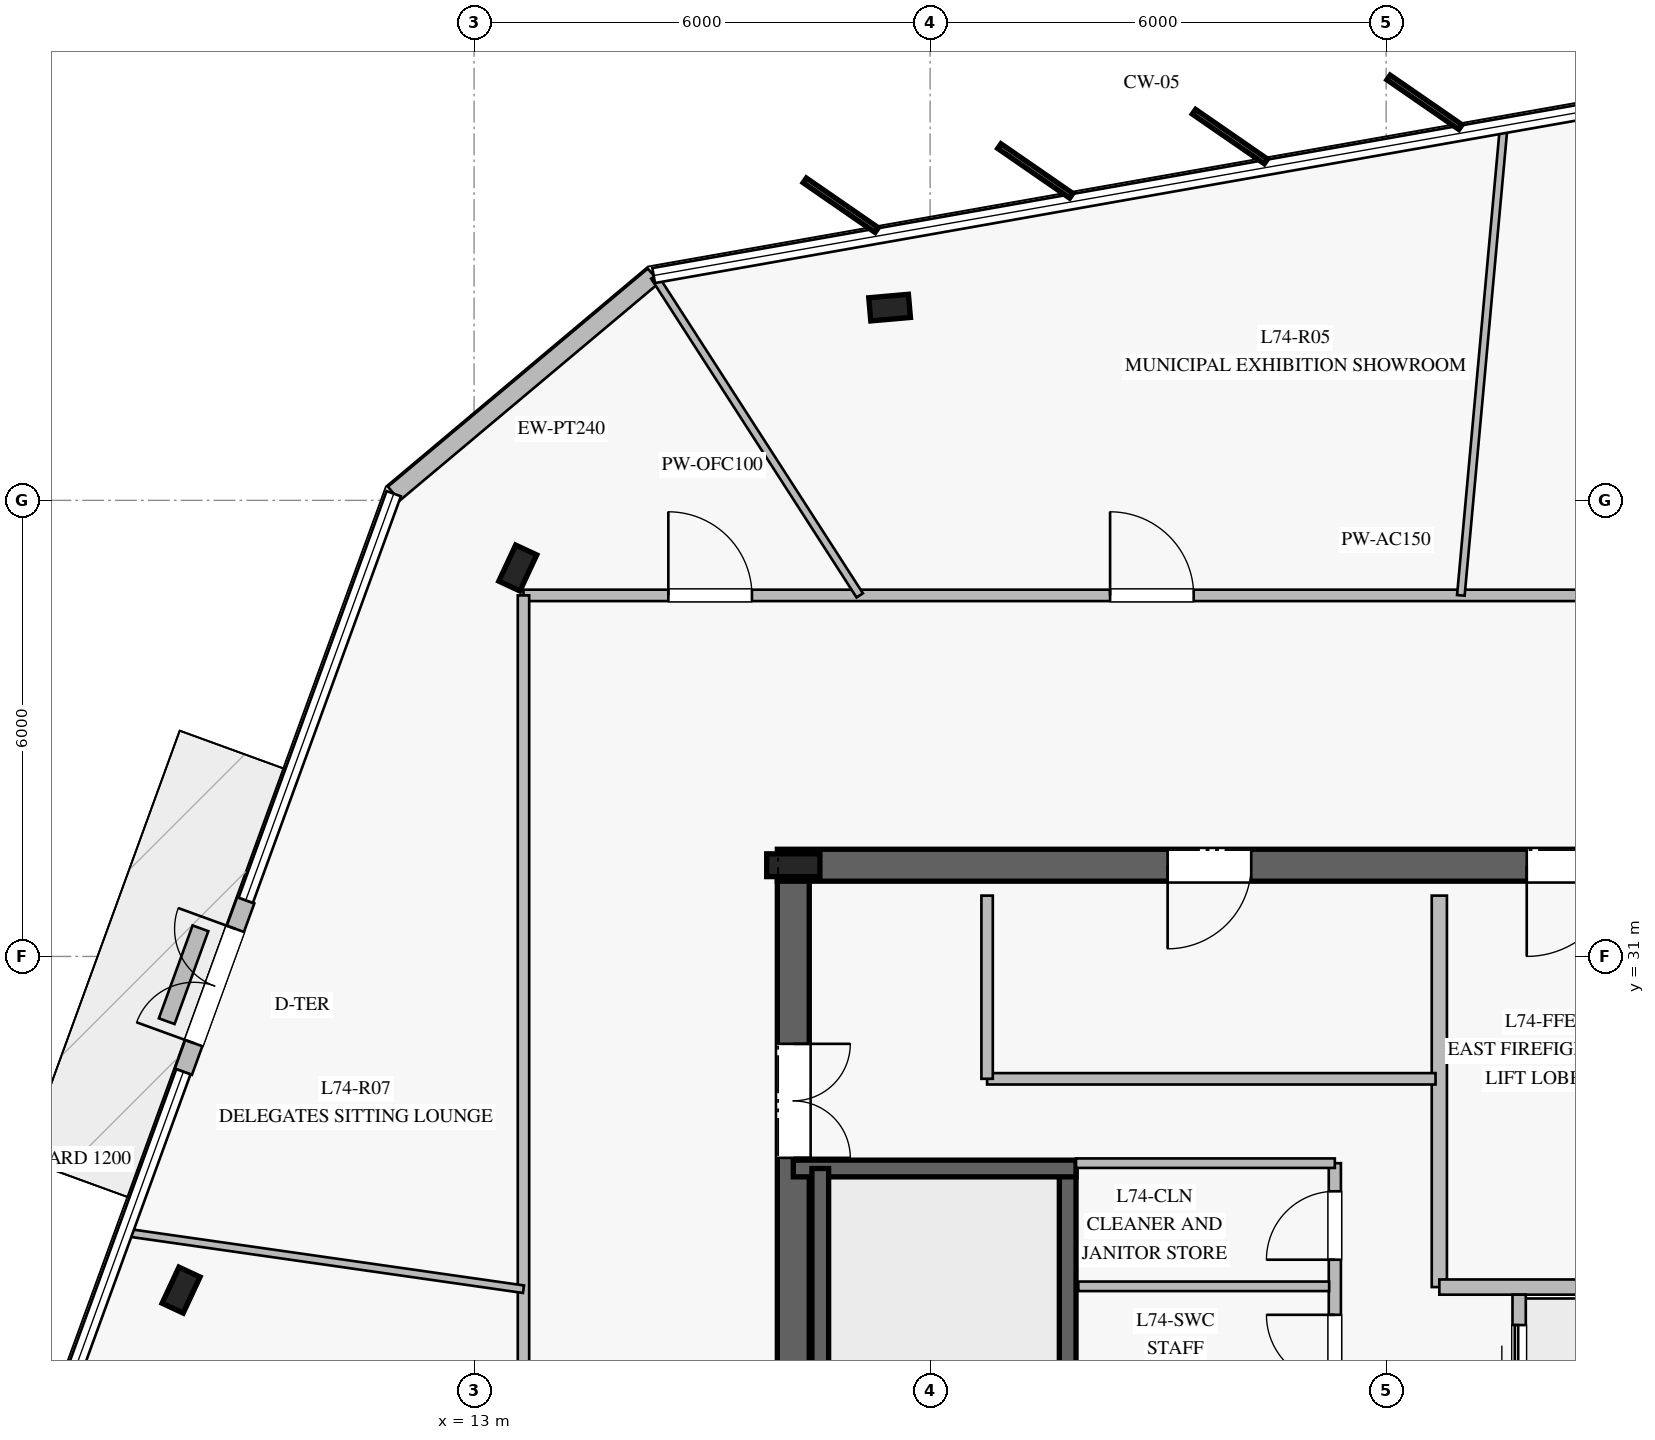
"""IFC4 building model, lengths in metres.
Left out: names, types, materials, properties, quantities, classifications, styles, units other than length and angle.
Written with IfcOpenShell. Run it as: python <this file> out.ifc"""

import sys

from ifc_helpers import new_model, si_unit, direction, frame, frame_2d, origin, origin_2d, place, context, subcontext, project, spatial, rectangle, i_section, extrude, element, fill, save


model = new_model("IFC4")
c1 = context("Model", 3, precision=1e-05, world=origin(), true_north=direction((0.0, 1.0)))
c2 = subcontext(c1, "Body", "Model", "MODEL_VIEW")
j1 = project(units=[si_unit("LENGTHUNIT", "METRE"), si_unit("PLANEANGLEUNIT", "RADIAN")], contexts=[c1])
p1 = place(None, origin())
s1 = spatial("IfcSite", under=j1, at=p1, CompositionType="ELEMENT")
p2 = place(p1, origin())
s2 = spatial("IfcBuilding", under=s1, at=p2, CompositionType="ELEMENT")
p3 = place(p2, frame((0.0, 0.0, 306.2)))
s3 = spatial("IfcBuildingStorey", under=s2, at=p3, CompositionType="ELEMENT", Elevation=306.2)
p4 = place(p3, frame((33.01, 32.2, 0.0), z_axis=(0.0, 0.0, 1.0), x_axis=(-1.0, 0.0, 0.0)))
e1 = element("IfcWall", 1, at=p4, inside=s3, PredefinedType="SHEAR", context=c2, shape_type="SweptSolid", body=[
    extrude(rectangle(XDim=16.02, YDim=0.42, at=frame_2d((8.01, 0.0))), origin(), (0.0, 0.0, 1.0), 3.78),
])
p5 = place(p4, frame((4.96, 0.0, 0.0)))
e2 = element("IfcOpeningElement", 2, at=p5, cuts=e1, PredefinedType="OPENING", context=c2, shape_type="SweptSolid", body=[
    extrude(rectangle(XDim=1.2, YDim=2.25, at=frame_2d((0.6, 1.125))), frame((0.0, 0.22, 0.0), z_axis=(0.0, -1.0, 0.0), x_axis=(1.0, 0.0, 0.0)), (0.0, 0.0, 1.0), 0.44),
])
p6 = place(p4, frame((9.785, 0.0, 0.0)))
e3 = element("IfcOpeningElement", 3, at=p6, cuts=e1, PredefinedType="OPENING", context=c2, shape_type="SweptSolid", body=[
    extrude(rectangle(XDim=1.1, YDim=2.2, at=frame_2d((0.55, 1.1))), frame((0.0, 0.22, 0.0), z_axis=(0.0, -1.0, 0.0), x_axis=(1.0, 0.0, 0.0)), (0.0, 0.0, 1.0), 0.44),
])
p7 = place(p3, frame((17.2, 31.99, 0.0), z_axis=(0.0, 0.0, 1.0), x_axis=(0.0, -1.0, 0.0)))
e4 = element("IfcWall", 4, at=p7, inside=s3, PredefinedType="SHEAR", context=c2, shape_type="SweptSolid", body=[
    extrude(rectangle(XDim=13.98, YDim=0.42, at=frame_2d((6.99, 0.0))), origin(), (0.0, 0.0, 1.0), 3.78),
])
p8 = place(p7, frame((2.14, 0.0, 0.0)))
e5 = element("IfcOpeningElement", 5, at=p8, cuts=e4, PredefinedType="OPENING", context=c2, shape_type="SweptSolid", body=[
    extrude(rectangle(XDim=1.5, YDim=2.2, at=frame_2d((0.75, 1.1))), frame((0.0, 0.22, 0.0), z_axis=(0.0, -1.0, 0.0), x_axis=(1.0, 0.0, 0.0)), (0.0, 0.0, 1.0), 0.44),
])
p9 = place(p3, frame((17.2, 32.2, 0.0), z_axis=(0.0, 0.0, 1.0), x_axis=(1.0, 0.0, 0.0)))
e6 = element("IfcColumn", 6, at=p9, inside=s3, PredefinedType="COLUMN", context=c2, shape_type="SweptSolid", body=[
    extrude(i_section(OverallWidth=0.3, OverallDepth=0.7, WebThickness=0.017, FlangeThickness=0.032, at=origin_2d()), origin(), (0.0, 0.0, 1.0), 4.0),
])
p10 = place(p3, frame((20.81, 20.99, 0.0), z_axis=(0.0, 0.0, 1.0), x_axis=(0.0, 1.0, 0.0)))
e7 = element("IfcWall", 7, at=p10, inside=s3, PredefinedType="SOLIDWALL", context=c2, shape_type="SweptSolid", body=[
    extrude(rectangle(XDim=7.22, YDim=0.22, at=frame_2d((3.61, 0.0))), origin(), (0.0, 0.0, 1.0), 3.78),
])
p11 = place(p10, frame((0.18, 0.0, 0.0)))
e8 = element("IfcOpeningElement", 8, at=p11, cuts=e7, PredefinedType="OPENING", context=c2, shape_type="SweptSolid", body=[
    extrude(rectangle(XDim=1.15, YDim=2.2, at=frame_2d((0.575, 1.1))), frame((0.0, 0.12, 0.0), z_axis=(0.0, -1.0, 0.0), x_axis=(1.0, 0.0, 0.0)), (0.0, 0.0, 1.0), 0.24),
])
p12 = place(p3, frame((17.2, 28.21, 0.0), z_axis=(0.0, 0.0, 1.0), x_axis=(1.0, 0.0, 0.0)))
e9 = element("IfcWall", 9, at=p12, inside=s3, PredefinedType="SOLIDWALL", context=c2, shape_type="SweptSolid", body=[
    extrude(rectangle(XDim=3.72, YDim=0.22, at=frame_2d((1.86, 0.0))), origin(), (0.0, 0.0, 1.0), 3.78),
])
p13 = place(p3, frame((17.555, 28.21, 0.0), z_axis=(0.0, 0.0, 1.0), x_axis=(0.0, -1.0, 0.0)))
e10 = element("IfcWall", 10, at=p13, inside=s3, PredefinedType="SOLIDWALL", context=c2, shape_type="SweptSolid", body=[
    extrude(rectangle(XDim=7.22, YDim=0.22, at=frame_2d((3.61, 0.0))), origin(), (0.0, 0.0, 1.0), 3.78),
])
for number, where, z_axis, x_axis in (
    (11, (18.467, 39.536, 0.0), (0.0, 0.0, 1.0), (0.996, 0.087, 0.0)),
    (12, (13.575, 36.11, 0.0), (0.0, 0.0, 1.0), (0.423, 0.906, 0.0)),
    (13, (9.145, 26.61, 0.0), (0.0, 0.0, 1.0), (0.423, 0.906, 0.0)),
):
    element("IfcColumn", number, at=place(p3, frame(where, z_axis=z_axis, x_axis=x_axis)), inside=s3, PredefinedType="COLUMN", context=c2, shape_type="SweptSolid", body=[
        extrude(i_section(OverallWidth=0.306, OverallDepth=0.524, WebThickness=0.021, FlangeThickness=0.04, at=origin_2d()), origin(), (0.0, 0.0, 1.0), 4.0),
    ])
p14 = place(p3, frame((15.363, 39.958, 0.0), z_axis=(0.0, 0.0, 1.0), x_axis=(-0.765993487021, -0.642848331912, 0.0)))
e14 = element("IfcWall", 14, at=p14, inside=s3, PredefinedType="STANDARD", context=c2, shape_type="SweptSolid", body=[
    extrude(rectangle(XDim=4.465, YDim=0.24, at=frame_2d((2.232, 0.0))), origin(), (0.0, 0.0, 1.0), 3.78),
])
p15 = place(p3, frame((9.996, 31.739, 0.0), z_axis=(0.0, 0.0, 1.0), x_axis=(-0.341979831546, -0.939707292095, 0.0)))
e15 = element("IfcWall", 15, at=p15, inside=s3, PredefinedType="STANDARD", context=c2, shape_type="SweptSolid", body=[
    extrude(rectangle(XDim=2.401, YDim=0.24, at=frame_2d((1.2, 0.0))), origin(), (0.0, 0.0, 1.0), 3.78),
])
p16 = place(p15, frame((0.4, 0.0, 0.0)))
e16 = element("IfcOpeningElement", 16, at=p16, cuts=e15, PredefinedType="OPENING", context=c2, shape_type="SweptSolid", body=[
    extrude(rectangle(XDim=1.6, YDim=2.25, at=frame_2d((0.8, 1.125))), frame((0.0, 0.13, 0.0), z_axis=(0.0, -1.0, 0.0), x_axis=(1.0, 0.0, 0.0)), (0.0, 0.0, 1.0), 0.26),
])
p17 = place(p3, frame((9.4, 31.37, 0.0), z_axis=(0.0, 0.0, 1.0), x_axis=(-0.341351063346, -0.939935876298, 0.0)))
e17 = element("IfcWall", 17, at=p17, inside=s3, PredefinedType="USERDEFINED", context=c2, shape_type="SweptSolid", body=[
    extrude(rectangle(XDim=1.3, YDim=0.22, at=frame_2d((0.65, 0.0))), origin(), (0.0, 0.0, 1.0), 0.4),
])
p18 = place(p3, frame((25.7, 26.65, 0.0), z_axis=(0.0, 0.0, 1.0), x_axis=(0.0, 1.0, 0.0)))
e18 = element("IfcWall", 18, at=p18, inside=s3, PredefinedType="PARTITIONING", context=c2, shape_type="SweptSolid", body=[
    extrude(rectangle(XDim=5.15, YDim=0.2, at=frame_2d((2.575, 0.0))), origin(), (0.0, 0.0, 1.0), 3.78),
])
p19 = place(p3, frame((25.7, 26.65, 0.0), z_axis=(0.0, 0.0, 1.0), x_axis=(1.0, 0.0, 0.0)))
e19 = element("IfcWall", 19, at=p19, inside=s3, PredefinedType="PARTITIONING", context=c2, shape_type="SweptSolid", body=[
    extrude(rectangle(XDim=3.38, YDim=0.2, at=frame_2d((1.69, 0.0))), origin(), (0.0, 0.0, 1.0), 3.78),
])
p20 = place(p3, frame((24.325, 23.35, 0.0), z_axis=(0.0, 0.0, 1.0), x_axis=(0.0, 1.0, 0.0)))
e20 = element("IfcWall", 20, at=p20, inside=s3, PredefinedType="PLUMBINGWALL", context=c2, shape_type="SweptSolid", body=[
    extrude(rectangle(XDim=4.93, YDim=0.16, at=frame_2d((2.465, 0.0))), origin(), (0.0, 0.0, 1.0), 3.78),
])
p21 = place(p20, frame((0.375, 0.0, 0.0)))
e21 = element("IfcOpeningElement", 21, at=p21, cuts=e20, PredefinedType="OPENING", context=c2, shape_type="SweptSolid", body=[
    extrude(rectangle(XDim=0.95, YDim=2.1, at=frame_2d((0.475, 1.05))), frame((0.0, 0.09, 0.0), z_axis=(0.0, -1.0, 0.0), x_axis=(1.0, 0.0, 0.0)), (0.0, 0.0, 1.0), 0.18),
])
p22 = place(p20, frame((2.035, 0.0, 0.0)))
e22 = element("IfcOpeningElement", 22, at=p22, cuts=e20, PredefinedType="OPENING", context=c2, shape_type="SweptSolid", body=[
    extrude(rectangle(XDim=0.9, YDim=2.1, at=frame_2d((0.45, 1.05))), frame((0.0, 0.09, 0.0), z_axis=(0.0, -1.0, 0.0), x_axis=(1.0, 0.0, 0.0)), (0.0, 0.0, 1.0), 0.18),
])
p23 = place(p20, frame((3.66, 0.0, 0.0)))
e23 = element("IfcOpeningElement", 23, at=p23, cuts=e20, PredefinedType="OPENING", context=c2, shape_type="SweptSolid", body=[
    extrude(rectangle(XDim=0.9, YDim=2.1, at=frame_2d((0.45, 1.05))), frame((0.0, 0.09, 0.0), z_axis=(0.0, -1.0, 0.0), x_axis=(1.0, 0.0, 0.0)), (0.0, 0.0, 1.0), 0.18),
])
p24 = place(p3, frame((20.92, 28.28, 0.0), z_axis=(0.0, 0.0, 1.0), x_axis=(1.0, 0.0, 0.0)))
e24 = element("IfcWall", 24, at=p24, inside=s3, PredefinedType="PARTITIONING", context=c2, shape_type="SweptSolid", body=[
    extrude(rectangle(XDim=3.405, YDim=0.125, at=frame_2d((1.703, 0.0))), origin(), (0.0, 0.0, 1.0), 3.78),
])
p25 = place(p3, frame((20.95, 26.66, 0.0), z_axis=(0.0, 0.0, 1.0), x_axis=(1.0, 0.0, 0.0)))
e25 = element("IfcWall", 25, at=p25, inside=s3, PredefinedType="PARTITIONING", context=c2, shape_type="SweptSolid", body=[
    extrude(rectangle(XDim=3.3, YDim=0.125, at=frame_2d((1.65, 0.0))), origin(), (0.0, 0.0, 1.0), 3.78),
])
p26 = place(p3, frame((19.75, 29.39, 0.0), z_axis=(0.0, 0.0, 1.0), x_axis=(1.0, 0.0, 0.0)))
e26 = element("IfcWall", 26, at=p26, inside=s3, PredefinedType="PARTITIONING", context=c2, shape_type="SweptSolid", body=[
    extrude(rectangle(XDim=5.9, YDim=0.15, at=frame_2d((2.95, 0.0))), origin(), (0.0, 0.0, 1.0), 3.78),
])
p27 = place(p3, frame((19.75, 29.39, 0.0), z_axis=(0.0, 0.0, 1.0), x_axis=(0.0, 1.0, 0.0)))
e27 = element("IfcWall", 27, at=p27, inside=s3, PredefinedType="PARTITIONING", context=c2, shape_type="SweptSolid", body=[
    extrude(rectangle(XDim=2.41, YDim=0.15, at=frame_2d((1.205, 0.0))), origin(), (0.0, 0.0, 1.0), 3.78),
])
p28 = place(p3, frame((26.75, 24.65, 0.0), z_axis=(0.0, 0.0, 1.0), x_axis=(0.0, 1.0, 0.0)))
e28 = element("IfcWall", 28, at=p28, inside=s3, PredefinedType="PARTITIONING", context=c2, shape_type="SweptSolid", body=[
    extrude(rectangle(XDim=1.9, YDim=0.175, at=frame_2d((0.95, 0.0))), origin(), (0.0, 0.0, 1.0), 3.78),
])
p29 = place(p28, frame((0.4, 0.0, 0.0)))
e29 = element("IfcOpeningElement", 29, at=p29, cuts=e28, PredefinedType="OPENING", context=c2, shape_type="SweptSolid", body=[
    extrude(rectangle(XDim=1.1, YDim=2.2, at=frame_2d((0.55, 1.1))), frame((0.0, 0.098, 0.0), z_axis=(0.0, -1.0, 0.0), x_axis=(1.0, 0.0, 0.0)), (0.0, 0.0, 1.0), 0.195),
])
p30 = place(p3, frame((13.65, 35.75, 0.0), z_axis=(0.0, 0.0, 1.0), x_axis=(1.0, 0.0, 0.0)))
e30 = element("IfcWall", 30, at=p30, inside=s3, PredefinedType="PARTITIONING", context=c2, shape_type="SweptSolid", body=[
    extrude(rectangle(XDim=22.7, YDim=0.15, at=frame_2d((11.35, 0.0))), origin(), (0.0, 0.0, 1.0), 3.28),
])
p31 = place(p30, frame((7.718, 0.0, 0.0)))
e31 = element("IfcOpeningElement", 31, at=p31, cuts=e30, PredefinedType="OPENING", context=c2, shape_type="SweptSolid", body=[
    extrude(rectangle(XDim=1.1, YDim=2.2, at=frame_2d((0.55, 1.1))), frame((0.0, 0.085, 0.0), z_axis=(0.0, -1.0, 0.0), x_axis=(1.0, 0.0, 0.0)), (0.0, 0.0, 1.0), 0.17),
])
p32 = place(p30, frame((16.786, 0.0, 0.0)))
e32 = element("IfcOpeningElement", 32, at=p32, cuts=e30, PredefinedType="OPENING", context=c2, shape_type="SweptSolid", body=[
    extrude(rectangle(XDim=1.1, YDim=2.2, at=frame_2d((0.55, 1.1))), frame((0.0, 0.085, 0.0), z_axis=(0.0, -1.0, 0.0), x_axis=(1.0, 0.0, 0.0)), (0.0, 0.0, 1.0), 0.17),
])
p33 = place(p30, frame((1.906, 0.0, 0.0)))
e33 = element("IfcOpeningElement", 33, at=p33, cuts=e30, PredefinedType="OPENING", context=c2, shape_type="SweptSolid", body=[
    extrude(rectangle(XDim=1.1, YDim=2.2, at=frame_2d((0.55, 1.1))), frame((0.0, 0.085, 0.0), z_axis=(0.0, -1.0, 0.0), x_axis=(1.0, 0.0, 0.0)), (0.0, 0.0, 1.0), 0.17),
])
p34 = place(p3, frame((13.65, 14.25, 0.0), z_axis=(0.0, 0.0, 1.0), x_axis=(0.0, 1.0, 0.0)))
e34 = element("IfcWall", 34, at=p34, inside=s3, PredefinedType="PARTITIONING", context=c2, shape_type="SweptSolid", body=[
    extrude(rectangle(XDim=21.5, YDim=0.15, at=frame_2d((10.75, 0.0))), origin(), (0.0, 0.0, 1.0), 3.25),
])
p35 = place(p34, frame((5.914, 0.0, 0.0)))
e35 = element("IfcOpeningElement", 35, at=p35, cuts=e34, PredefinedType="OPENING", context=c2, shape_type="SweptSolid", body=[
    extrude(rectangle(XDim=1.1, YDim=2.2, at=frame_2d((0.55, 1.1))), frame((0.0, 0.085, 0.0), z_axis=(0.0, -1.0, 0.0), x_axis=(1.0, 0.0, 0.0)), (0.0, 0.0, 1.0), 0.17),
])
p36 = place(p3, frame((18.074, 35.75, 0.0), z_axis=(0.0, 0.0, 1.0), x_axis=(-0.541566097493, 0.840658171938, 0.0)))
e36 = element("IfcWall", 36, at=p36, inside=s3, PredefinedType="MOVABLE", context=c2, shape_type="SweptSolid", body=[
    extrude(rectangle(XDim=4.989, YDim=0.1, at=frame_2d((2.495, 0.0))), origin(), (0.0, 0.0, 1.0), 3.28),
])
p37 = place(p3, frame((13.65, 26.622, 0.0), z_axis=(0.0, 0.0, 1.0), x_axis=(-0.989949493661, 0.141421356237, 0.0)))
e37 = element("IfcWall", 37, at=p37, inside=s3, PredefinedType="MOVABLE", context=c2, shape_type="SweptSolid", body=[
    extrude(rectangle(XDim=5.281, YDim=0.1, at=frame_2d((2.64, 0.0))), origin(), (0.0, 0.0, 1.0), 3.28),
])
p38 = place(p3, frame((25.983, 35.75, 0.0), z_axis=(0.0, 0.0, 1.0), x_axis=(0.091150962687, 0.995837086074, 0.0)))
e38 = element("IfcWall", 38, at=p38, inside=s3, PredefinedType="MOVABLE", context=c2, shape_type="SweptSolid", body=[
    extrude(rectangle(XDim=6.19, YDim=0.1, at=frame_2d((3.095, 0.0))), origin(), (0.0, 0.0, 1.0), 3.28),
])
p39 = place(p16, frame((1.6, 0.0, 0.0), z_axis=(0.0, 0.0, 1.0), x_axis=(-1.0, 0.0, 0.0)))
e39 = element("IfcDoor", 39, at=p39, inside=s3, OperationType="DOUBLE_DOOR_SINGLE_SWING", PredefinedType="DOOR", context=c2, shape_type="SweptSolid", body=[
    extrude(rectangle(XDim=1.6, YDim=2.25, at=frame_2d((0.8, 1.125))), frame((0.0, 0.025, 0.0), z_axis=(0.0, -1.0, 0.0), x_axis=(1.0, 0.0, 0.0)), (0.0, 0.0, 1.0), 0.05),
])
fill(e16, e39)
p40 = place(p5, origin())
e40 = element("IfcDoor", 40, at=p40, inside=s3, OperationType="SINGLE_SWING_RIGHT", PredefinedType="DOOR", context=c2, shape_type="SweptSolid", body=[
    extrude(rectangle(XDim=1.2, YDim=2.25, at=frame_2d((0.6, 1.125))), frame((0.0, 0.025, 0.0), z_axis=(0.0, -1.0, 0.0), x_axis=(1.0, 0.0, 0.0)), (0.0, 0.0, 1.0), 0.05),
])
fill(e2, e40)
p41 = place(p8, origin())
e41 = element("IfcDoor", 41, at=p41, inside=s3, OperationType="DOUBLE_DOOR_SINGLE_SWING", PredefinedType="DOOR", context=c2, shape_type="SweptSolid", body=[
    extrude(rectangle(XDim=1.5, YDim=2.2, at=frame_2d((0.75, 1.1))), frame((0.0, 0.025, 0.0), z_axis=(0.0, -1.0, 0.0), x_axis=(1.0, 0.0, 0.0)), (0.0, 0.0, 1.0), 0.05),
])
fill(e5, e41)
p42 = place(p22, origin())
e42 = element("IfcDoor", 42, at=p42, inside=s3, OperationType="SINGLE_SWING_RIGHT", PredefinedType="DOOR", context=c2, shape_type="SweptSolid", body=[
    extrude(rectangle(XDim=0.9, YDim=2.1, at=frame_2d((0.45, 1.05))), frame((0.0, 0.025, 0.0), z_axis=(0.0, -1.0, 0.0), x_axis=(1.0, 0.0, 0.0)), (0.0, 0.0, 1.0), 0.05),
])
fill(e22, e42)
p43 = place(p23, origin())
e43 = element("IfcDoor", 43, at=p43, inside=s3, OperationType="SINGLE_SWING_LEFT", PredefinedType="DOOR", context=c2, shape_type="SweptSolid", body=[
    extrude(rectangle(XDim=0.9, YDim=2.1, at=frame_2d((0.45, 1.05))), frame((0.0, 0.025, 0.0), z_axis=(0.0, -1.0, 0.0), x_axis=(1.0, 0.0, 0.0)), (0.0, 0.0, 1.0), 0.05),
])
fill(e23, e43)
p44 = place(p6, origin())
e44 = element("IfcDoor", 44, at=p44, inside=s3, OperationType="SINGLE_SWING_RIGHT", PredefinedType="DOOR", context=c2, shape_type="SweptSolid", body=[
    extrude(rectangle(XDim=1.1, YDim=2.2, at=frame_2d((0.55, 1.1))), frame((0.0, 0.025, 0.0), z_axis=(0.0, -1.0, 0.0), x_axis=(1.0, 0.0, 0.0)), (0.0, 0.0, 1.0), 0.05),
])
fill(e3, e44)
p45 = place(p29, origin())
e45 = element("IfcDoor", 45, at=p45, inside=s3, OperationType="DOUBLE_DOOR_SLIDING", PredefinedType="DOOR", context=c2, shape_type="SweptSolid", body=[
    extrude(rectangle(XDim=1.1, YDim=2.2, at=frame_2d((0.55, 1.1))), frame((0.0, 0.025, 0.0), z_axis=(0.0, -1.0, 0.0), x_axis=(1.0, 0.0, 0.0)), (0.0, 0.0, 1.0), 0.05),
])
fill(e29, e45)
p46 = place(p31, origin())
e46 = element("IfcDoor", 46, at=p46, inside=s3, OperationType="SINGLE_SWING_LEFT", PredefinedType="DOOR", context=c2, shape_type="SweptSolid", body=[
    extrude(rectangle(XDim=1.1, YDim=2.2, at=frame_2d((0.55, 1.1))), frame((0.0, 0.025, 0.0), z_axis=(0.0, -1.0, 0.0), x_axis=(1.0, 0.0, 0.0)), (0.0, 0.0, 1.0), 0.05),
])
fill(e31, e46)
p47 = place(p33, origin())
e47 = element("IfcDoor", 47, at=p47, inside=s3, OperationType="SINGLE_SWING_LEFT", PredefinedType="DOOR", context=c2, shape_type="SweptSolid", body=[
    extrude(rectangle(XDim=1.1, YDim=2.2, at=frame_2d((0.55, 1.1))), frame((0.0, 0.025, 0.0), z_axis=(0.0, -1.0, 0.0), x_axis=(1.0, 0.0, 0.0)), (0.0, 0.0, 1.0), 0.05),
])
fill(e33, e47)
save(model, sys.argv[1])
